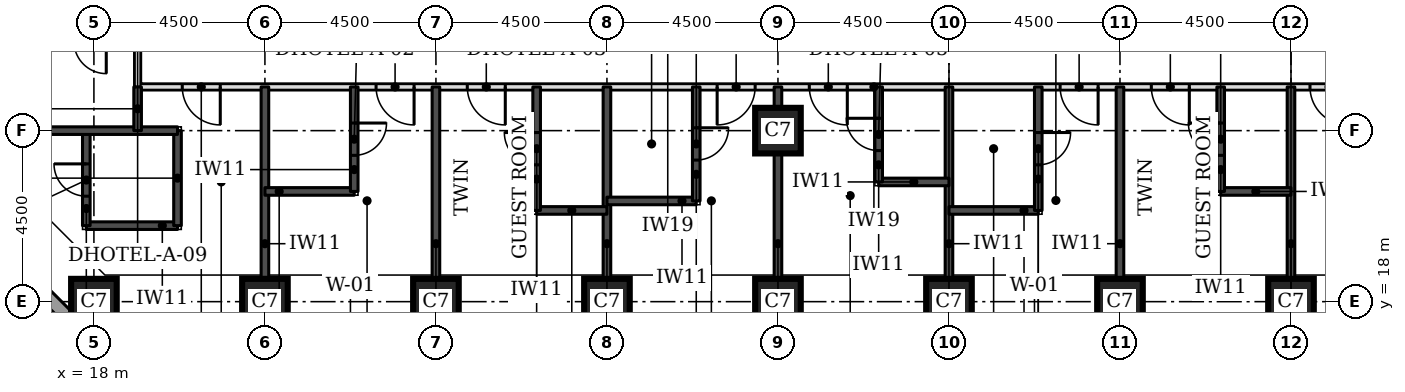
"""IFC4 building model, lengths in metres.
Left out: names, types, materials, properties, quantities, classifications, styles, units other than length and angle.
Written with IfcOpenShell. Run it as: python <this file> out.ifc"""

import sys

from ifc_helpers import new_model, si_unit, direction, frame, frame_2d, origin, origin_2d, place, context, subcontext, project, spatial, rectangle, extrude, element, fill, save


model = new_model("IFC4")
c1 = context("Model", 3, precision=1e-05, world=origin(), true_north=direction((0.0, 1.0)))
c2 = subcontext(c1, "Body", "Model", "MODEL_VIEW")
j1 = project(units=[si_unit("LENGTHUNIT", "METRE"), si_unit("PLANEANGLEUNIT", "RADIAN")], contexts=[c1])
p1 = place(None, origin())
s1 = spatial("IfcSite", under=j1, at=p1, CompositionType="ELEMENT")
p2 = place(p1, origin())
s2 = spatial("IfcBuilding", under=s1, at=p2, CompositionType="ELEMENT")
p3 = place(p2, frame((0.0, 0.0, 26.4)))
s3 = spatial("IfcBuildingStorey", under=s2, at=p3, CompositionType="ELEMENT", Elevation=26.4)
for number, where, z_axis, x_axis in (
    (1, (18.0, 18.0, 0.0), (0.0, 0.0, 1.0), (1.0, 0.0, 0.0)),
    (2, (22.5, 18.0, 0.0), (0.0, 0.0, 1.0), (1.0, 0.0, 0.0)),
    (3, (27.0, 18.0, 0.0), (0.0, 0.0, 1.0), (1.0, 0.0, 0.0)),
    (4, (31.5, 18.0, 0.0), (0.0, 0.0, 1.0), (1.0, 0.0, 0.0)),
    (5, (36.0, 18.0, 0.0), (0.0, 0.0, 1.0), (1.0, 0.0, 0.0)),
    (6, (40.5, 18.0, 0.0), (0.0, 0.0, 1.0), (1.0, 0.0, 0.0)),
    (7, (45.0, 18.0, 0.0), (0.0, 0.0, 1.0), (1.0, 0.0, 0.0)),
    (8, (49.5, 18.0, 0.0), (0.0, 0.0, 1.0), (1.0, 0.0, 0.0)),
    (9, (36.0, 22.5, 0.0), (0.0, 0.0, 1.0), (1.0, 0.0, 0.0)),
):
    element("IfcColumn", number, at=place(p3, frame(where, z_axis=z_axis, x_axis=x_axis)), inside=s3, PredefinedType="COLUMN", context=c2, shape_type="SweptSolid", body=[
        extrude(rectangle(XDim=1.2, YDim=1.2, at=origin_2d()), origin(), (0.0, 0.0, 1.0), 3.3),
    ])
p4 = place(p3, frame((12.674, 22.23, 0.0), z_axis=(0.0, 0.0, 1.0), x_axis=(0.707106781187, -0.707106781187, 0.0)))
e10 = element("IfcWall", 10, at=p4, inside=s3, PredefinedType="STANDARD", context=c2, shape_type="SweptSolid", body=[
    extrude(rectangle(XDim=7.151, YDim=0.35, at=frame_2d((3.576, 0.0))), origin(), (0.0, 0.0, 1.0), 3.055),
])
p5 = place(p4, frame((1.926, 0.0, 0.8)))
e11 = element("IfcOpeningElement", 11, at=p5, cuts=e10, PredefinedType="OPENING", context=c2, shape_type="SweptSolid", body=[
    extrude(rectangle(XDim=3.3, YDim=1.5, at=frame_2d((1.65, 0.75))), frame((0.0, 0.185, 0.0), z_axis=(0.0, -1.0, 0.0), x_axis=(1.0, 0.0, 0.0)), (0.0, 0.0, 1.0), 0.37),
])
p6 = place(p3, frame((19.15, 23.65, 0.0), z_axis=(0.0, 0.0, 1.0), x_axis=(1.0, 0.0, 0.0)))
e12 = element("IfcWall", 12, at=p6, inside=s3, PredefinedType="PARTITIONING", context=c2, shape_type="SweptSolid", body=[
    extrude(rectangle(XDim=32.35, YDim=0.15, at=frame_2d((16.175, 0.0))), origin(), (0.0, 0.0, 1.0), 3.08),
])
p7 = place(p6, frame((6.275, 0.0, 0.0)))
e13 = element("IfcOpeningElement", 13, at=p7, cuts=e12, PredefinedType="OPENING", context=c2, shape_type="SweptSolid", body=[
    extrude(rectangle(XDim=1.0, YDim=2.1, at=frame_2d((0.5, 1.05))), frame((0.0, 0.085, 0.0), z_axis=(0.0, -1.0, 0.0), x_axis=(1.0, 0.0, 0.0)), (0.0, 0.0, 1.0), 0.17),
])
p8 = place(p6, frame((8.675, 0.0, 0.0)))
e14 = element("IfcOpeningElement", 14, at=p8, cuts=e12, PredefinedType="OPENING", context=c2, shape_type="SweptSolid", body=[
    extrude(rectangle(XDim=1.0, YDim=2.1, at=frame_2d((0.5, 1.05))), frame((0.0, 0.085, 0.0), z_axis=(0.0, -1.0, 0.0), x_axis=(1.0, 0.0, 0.0)), (0.0, 0.0, 1.0), 0.17),
])
p9 = place(p6, frame((15.25, 0.0, 0.0)))
e15 = element("IfcOpeningElement", 15, at=p9, cuts=e12, PredefinedType="OPENING", context=c2, shape_type="SweptSolid", body=[
    extrude(rectangle(XDim=1.0, YDim=2.1, at=frame_2d((0.5, 1.05))), frame((0.0, 0.085, 0.0), z_axis=(0.0, -1.0, 0.0), x_axis=(1.0, 0.0, 0.0)), (0.0, 0.0, 1.0), 0.17),
])
p10 = place(p6, frame((17.675, 0.0, 0.0)))
e16 = element("IfcOpeningElement", 16, at=p10, cuts=e12, PredefinedType="OPENING", context=c2, shape_type="SweptSolid", body=[
    extrude(rectangle(XDim=1.0, YDim=2.1, at=frame_2d((0.5, 1.05))), frame((0.0, 0.085, 0.0), z_axis=(0.0, -1.0, 0.0), x_axis=(1.0, 0.0, 0.0)), (0.0, 0.0, 1.0), 0.17),
])
p11 = place(p6, frame((24.275, 0.0, 0.0)))
e17 = element("IfcOpeningElement", 17, at=p11, cuts=e12, PredefinedType="OPENING", context=c2, shape_type="SweptSolid", body=[
    extrude(rectangle(XDim=1.0, YDim=2.1, at=frame_2d((0.5, 1.05))), frame((0.0, 0.085, 0.0), z_axis=(0.0, -1.0, 0.0), x_axis=(1.0, 0.0, 0.0)), (0.0, 0.0, 1.0), 0.17),
])
p12 = place(p6, frame((26.675, 0.0, 0.0)))
e18 = element("IfcOpeningElement", 18, at=p12, cuts=e12, PredefinedType="OPENING", context=c2, shape_type="SweptSolid", body=[
    extrude(rectangle(XDim=1.0, YDim=2.1, at=frame_2d((0.5, 1.05))), frame((0.0, 0.085, 0.0), z_axis=(0.0, -1.0, 0.0), x_axis=(1.0, 0.0, 0.0)), (0.0, 0.0, 1.0), 0.17),
])
p13 = place(p6, frame((1.175, 0.0, 0.0)))
e19 = element("IfcOpeningElement", 19, at=p13, cuts=e12, PredefinedType="OPENING", context=c2, shape_type="SweptSolid", body=[
    extrude(rectangle(XDim=1.0, YDim=2.1, at=frame_2d((0.5, 1.05))), frame((0.0, 0.085, 0.0), z_axis=(0.0, -1.0, 0.0), x_axis=(1.0, 0.0, 0.0)), (0.0, 0.0, 1.0), 0.17),
])
p14 = place(p6, frame((30.85, 0.0, 0.0)))
e20 = element("IfcOpeningElement", 20, at=p14, cuts=e12, PredefinedType="OPENING", context=c2, shape_type="SweptSolid", body=[
    extrude(rectangle(XDim=1.0, YDim=2.1, at=frame_2d((0.5, 1.05))), frame((0.0, 0.085, 0.0), z_axis=(0.0, -1.0, 0.0), x_axis=(1.0, 0.0, 0.0)), (0.0, 0.0, 1.0), 0.17),
])
p15 = place(p3, frame((19.15, 23.65, 0.0), z_axis=(0.0, 0.0, 1.0), x_axis=(0.0, 1.0, 0.0)))
e21 = element("IfcWall", 21, at=p15, inside=s3, PredefinedType="PARTITIONING", context=c2, shape_type="SweptSolid", body=[
    extrude(rectangle(XDim=25.85, YDim=0.15, at=frame_2d((12.925, 0.0))), origin(), (0.0, 0.0, 1.0), 3.08),
])
p16 = place(p15, frame((1.775, 0.0, 0.0)))
e22 = element("IfcOpeningElement", 22, at=p16, cuts=e21, PredefinedType="OPENING", context=c2, shape_type="SweptSolid", body=[
    extrude(rectangle(XDim=1.0, YDim=2.1, at=frame_2d((0.5, 1.05))), frame((0.0, 0.085, 0.0), z_axis=(0.0, -1.0, 0.0), x_axis=(1.0, 0.0, 0.0)), (0.0, 0.0, 1.0), 0.17),
])
p17 = place(p15, frame((6.125, 0.0, 0.0)))
e23 = element("IfcOpeningElement", 23, at=p17, cuts=e21, PredefinedType="OPENING", context=c2, shape_type="SweptSolid", body=[
    extrude(rectangle(XDim=1.0, YDim=2.1, at=frame_2d((0.5, 1.05))), frame((0.0, 0.085, 0.0), z_axis=(0.0, -1.0, 0.0), x_axis=(1.0, 0.0, 0.0)), (0.0, 0.0, 1.0), 0.17),
])
p18 = place(p15, frame((17.825, 0.0, 0.0)))
e24 = element("IfcOpeningElement", 24, at=p18, cuts=e21, PredefinedType="OPENING", context=c2, shape_type="SweptSolid", body=[
    extrude(rectangle(XDim=1.0, YDim=2.1, at=frame_2d((0.5, 1.05))), frame((0.0, 0.085, 0.0), z_axis=(0.0, -1.0, 0.0), x_axis=(1.0, 0.0, 0.0)), (0.0, 0.0, 1.0), 0.17),
])
p19 = place(p15, frame((23.04, 0.0, 0.0)))
e25 = element("IfcOpeningElement", 25, at=p19, cuts=e21, PredefinedType="OPENING", context=c2, shape_type="SweptSolid", body=[
    extrude(rectangle(XDim=0.9, YDim=2.1, at=frame_2d((0.45, 1.05))), frame((0.0, 0.085, 0.0), z_axis=(0.0, -1.0, 0.0), x_axis=(1.0, 0.0, 0.0)), (0.0, 0.0, 1.0), 0.17),
])
for number, where, z_axis, x_axis in (
    (26, (22.5, 18.6, 0.0), (0.0, 0.0, 1.0), (0.0, 1.0, 0.0)),
    (27, (27.0, 18.6, 0.0), (0.0, 0.0, 1.0), (0.0, 1.0, 0.0)),
    (28, (31.5, 18.6, 0.0), (0.0, 0.0, 1.0), (0.0, 1.0, 0.0)),
    (29, (36.0, 18.6, 0.0), (0.0, 0.0, 1.0), (0.0, 1.0, 0.0)),
    (30, (40.5, 18.6, 0.0), (0.0, 0.0, 1.0), (0.0, 1.0, 0.0)),
    (31, (45.0, 18.6, 0.0), (0.0, 0.0, 1.0), (0.0, 1.0, 0.0)),
    (32, (49.5, 18.6, 0.0), (0.0, 0.0, 1.0), (0.0, 1.0, 0.0)),
):
    element("IfcWall", number, at=place(p3, frame(where, z_axis=z_axis, x_axis=x_axis)), inside=s3, PredefinedType="SOLIDWALL", context=c2, shape_type="SweptSolid", body=[
        extrude(rectangle(XDim=5.05, YDim=0.2, at=frame_2d((2.525, 0.0))), origin(), (0.0, 0.0, 1.0), 3.08),
    ])
p20 = place(p3, frame((17.8, 20.0, 0.0), z_axis=(0.0, 0.0, 1.0), x_axis=(1.0, 0.0, 0.0)))
e33 = element("IfcWall", 33, at=p20, inside=s3, PredefinedType="SOLIDWALL", context=c2, shape_type="SweptSolid", body=[
    extrude(rectangle(XDim=2.4, YDim=0.2, at=frame_2d((1.2, 0.0))), origin(), (0.0, 0.0, 1.0), 3.08),
])
p21 = place(p3, frame((17.8, 20.0, 0.0), z_axis=(0.0, 0.0, 1.0), x_axis=(0.0, 1.0, 0.0)))
e34 = element("IfcWall", 34, at=p21, inside=s3, PredefinedType="SOLIDWALL", context=c2, shape_type="SweptSolid", body=[
    extrude(rectangle(XDim=2.5, YDim=0.2, at=frame_2d((1.25, 0.0))), origin(), (0.0, 0.0, 1.0), 3.08),
])
p22 = place(p21, frame((0.775, 0.0, 0.0)))
e35 = element("IfcOpeningElement", 35, at=p22, cuts=e34, PredefinedType="OPENING", context=c2, shape_type="SweptSolid", body=[
    extrude(rectangle(XDim=0.85, YDim=2.1, at=frame_2d((0.425, 1.05))), frame((0.0, 0.11, 0.0), z_axis=(0.0, -1.0, 0.0), x_axis=(1.0, 0.0, 0.0)), (0.0, 0.0, 1.0), 0.22),
])
p23 = place(p3, frame((20.2, 20.0, 0.0), z_axis=(0.0, 0.0, 1.0), x_axis=(0.0, 1.0, 0.0)))
e36 = element("IfcWall", 36, at=p23, inside=s3, PredefinedType="SOLIDWALL", context=c2, shape_type="SweptSolid", body=[
    extrude(rectangle(XDim=2.5, YDim=0.2, at=frame_2d((1.25, 0.0))), origin(), (0.0, 0.0, 1.0), 3.08),
])
p24 = place(p3, frame((29.65, 20.4, 0.0), z_axis=(0.0, 0.0, 1.0), x_axis=(1.0, 0.0, 0.0)))
e37 = element("IfcWall", 37, at=p24, inside=s3, PredefinedType="SOLIDWALL", context=c2, shape_type="SweptSolid", body=[
    extrude(rectangle(XDim=1.85, YDim=0.2, at=frame_2d((0.925, 0.0))), origin(), (0.0, 0.0, 1.0), 3.08),
])
p25 = place(p3, frame((29.65, 20.4, 0.0), z_axis=(0.0, 0.0, 1.0), x_axis=(0.0, 1.0, 0.0)))
e38 = element("IfcWall", 38, at=p25, inside=s3, PredefinedType="SOLIDWALL", context=c2, shape_type="SweptSolid", body=[
    extrude(rectangle(XDim=3.25, YDim=0.2, at=frame_2d((1.625, 0.0))), origin(), (0.0, 0.0, 1.0), 3.08),
])
p26 = place(p25, frame((1.2, 0.0, 0.0)))
e39 = element("IfcOpeningElement", 39, at=p26, cuts=e38, PredefinedType="OPENING", context=c2, shape_type="SweptSolid", body=[
    extrude(rectangle(XDim=0.85, YDim=2.1, at=frame_2d((0.425, 1.05))), frame((0.0, 0.11, 0.0), z_axis=(0.0, -1.0, 0.0), x_axis=(1.0, 0.0, 0.0)), (0.0, 0.0, 1.0), 0.22),
])
p27 = place(p3, frame((40.5, 20.4, 0.0), z_axis=(0.0, 0.0, 1.0), x_axis=(1.0, 0.0, 0.0)))
e40 = element("IfcWall", 40, at=p27, inside=s3, PredefinedType="SOLIDWALL", context=c2, shape_type="SweptSolid", body=[
    extrude(rectangle(XDim=2.35, YDim=0.2, at=frame_2d((1.175, 0.0))), origin(), (0.0, 0.0, 1.0), 3.08),
])
p28 = place(p3, frame((42.85, 20.4, 0.0), z_axis=(0.0, 0.0, 1.0), x_axis=(0.0, 1.0, 0.0)))
e41 = element("IfcWall", 41, at=p28, inside=s3, PredefinedType="SOLIDWALL", context=c2, shape_type="SweptSolid", body=[
    extrude(rectangle(XDim=3.25, YDim=0.2, at=frame_2d((1.625, 0.0))), origin(), (0.0, 0.0, 1.0), 3.08),
])
p29 = place(p28, frame((1.2, 0.0, 0.0)))
e42 = element("IfcOpeningElement", 42, at=p29, cuts=e41, PredefinedType="OPENING", context=c2, shape_type="SweptSolid", body=[
    extrude(rectangle(XDim=0.85, YDim=2.1, at=frame_2d((0.425, 1.05))), frame((0.0, 0.11, 0.0), z_axis=(0.0, -1.0, 0.0), x_axis=(1.0, 0.0, 0.0)), (0.0, 0.0, 1.0), 0.22),
])
p30 = place(p3, frame((31.5, 20.65, 0.0), z_axis=(0.0, 0.0, 1.0), x_axis=(1.0, 0.0, 0.0)))
e43 = element("IfcWall", 43, at=p30, inside=s3, PredefinedType="SOLIDWALL", context=c2, shape_type="SweptSolid", body=[
    extrude(rectangle(XDim=2.35, YDim=0.2, at=frame_2d((1.175, 0.0))), origin(), (0.0, 0.0, 1.0), 3.08),
])
p31 = place(p3, frame((33.85, 20.65, 0.0), z_axis=(0.0, 0.0, 1.0), x_axis=(0.0, 1.0, 0.0)))
e44 = element("IfcWall", 44, at=p31, inside=s3, PredefinedType="SOLIDWALL", context=c2, shape_type="SweptSolid", body=[
    extrude(rectangle(XDim=3.0, YDim=0.2, at=frame_2d((1.5, 0.0))), origin(), (0.0, 0.0, 1.0), 3.08),
])
p32 = place(p31, frame((1.075, 0.0, 0.0)))
e45 = element("IfcOpeningElement", 45, at=p32, cuts=e44, PredefinedType="OPENING", context=c2, shape_type="SweptSolid", body=[
    extrude(rectangle(XDim=0.85, YDim=2.1, at=frame_2d((0.425, 1.05))), frame((0.0, 0.11, 0.0), z_axis=(0.0, -1.0, 0.0), x_axis=(1.0, 0.0, 0.0)), (0.0, 0.0, 1.0), 0.22),
])
p33 = place(p3, frame((22.5, 20.9, 0.0), z_axis=(0.0, 0.0, 1.0), x_axis=(1.0, 0.0, 0.0)))
e46 = element("IfcWall", 46, at=p33, inside=s3, PredefinedType="SOLIDWALL", context=c2, shape_type="SweptSolid", body=[
    extrude(rectangle(XDim=2.35, YDim=0.2, at=frame_2d((1.175, 0.0))), origin(), (0.0, 0.0, 1.0), 3.08),
])
p34 = place(p3, frame((24.85, 20.9, 0.0), z_axis=(0.0, 0.0, 1.0), x_axis=(0.0, 1.0, 0.0)))
e47 = element("IfcWall", 47, at=p34, inside=s3, PredefinedType="SOLIDWALL", context=c2, shape_type="SweptSolid", body=[
    extrude(rectangle(XDim=2.75, YDim=0.2, at=frame_2d((1.375, 0.0))), origin(), (0.0, 0.0, 1.0), 3.08),
])
p35 = place(p34, frame((0.95, 0.0, 0.0)))
e48 = element("IfcOpeningElement", 48, at=p35, cuts=e47, PredefinedType="OPENING", context=c2, shape_type="SweptSolid", body=[
    extrude(rectangle(XDim=0.85, YDim=2.1, at=frame_2d((0.425, 1.05))), frame((0.0, 0.11, 0.0), z_axis=(0.0, -1.0, 0.0), x_axis=(1.0, 0.0, 0.0)), (0.0, 0.0, 1.0), 0.22),
])
p36 = place(p3, frame((47.65, 20.9, 0.0), z_axis=(0.0, 0.0, 1.0), x_axis=(1.0, 0.0, 0.0)))
e49 = element("IfcWall", 49, at=p36, inside=s3, PredefinedType="SOLIDWALL", context=c2, shape_type="SweptSolid", body=[
    extrude(rectangle(XDim=1.85, YDim=0.2, at=frame_2d((0.925, 0.0))), origin(), (0.0, 0.0, 1.0), 3.08),
])
p37 = place(p3, frame((47.65, 20.9, 0.0), z_axis=(0.0, 0.0, 1.0), x_axis=(0.0, 1.0, 0.0)))
e50 = element("IfcWall", 50, at=p37, inside=s3, PredefinedType="SOLIDWALL", context=c2, shape_type="SweptSolid", body=[
    extrude(rectangle(XDim=2.75, YDim=0.2, at=frame_2d((1.375, 0.0))), origin(), (0.0, 0.0, 1.0), 3.08),
])
p38 = place(p37, frame((0.95, 0.0, 0.0)))
e51 = element("IfcOpeningElement", 51, at=p38, cuts=e50, PredefinedType="OPENING", context=c2, shape_type="SweptSolid", body=[
    extrude(rectangle(XDim=0.85, YDim=2.1, at=frame_2d((0.425, 1.05))), frame((0.0, 0.11, 0.0), z_axis=(0.0, -1.0, 0.0), x_axis=(1.0, 0.0, 0.0)), (0.0, 0.0, 1.0), 0.22),
])
p39 = place(p3, frame((38.65, 21.15, 0.0), z_axis=(0.0, 0.0, 1.0), x_axis=(1.0, 0.0, 0.0)))
e52 = element("IfcWall", 52, at=p39, inside=s3, PredefinedType="SOLIDWALL", context=c2, shape_type="SweptSolid", body=[
    extrude(rectangle(XDim=1.85, YDim=0.2, at=frame_2d((0.925, 0.0))), origin(), (0.0, 0.0, 1.0), 3.08),
])
p40 = place(p3, frame((38.65, 21.15, 0.0), z_axis=(0.0, 0.0, 1.0), x_axis=(0.0, 1.0, 0.0)))
e53 = element("IfcWall", 53, at=p40, inside=s3, PredefinedType="SOLIDWALL", context=c2, shape_type="SweptSolid", body=[
    extrude(rectangle(XDim=2.5, YDim=0.2, at=frame_2d((1.25, 0.0))), origin(), (0.0, 0.0, 1.0), 3.08),
])
p41 = place(p40, frame((0.825, 0.0, 0.0)))
e54 = element("IfcOpeningElement", 54, at=p41, cuts=e53, PredefinedType="OPENING", context=c2, shape_type="SweptSolid", body=[
    extrude(rectangle(XDim=0.85, YDim=2.1, at=frame_2d((0.425, 1.05))), frame((0.0, 0.11, 0.0), z_axis=(0.0, -1.0, 0.0), x_axis=(1.0, 0.0, 0.0)), (0.0, 0.0, 1.0), 0.22),
])
p42 = place(p3, frame((14.1, 22.5, 0.0), z_axis=(0.0, 0.0, 1.0), x_axis=(1.0, 0.0, 0.0)))
e55 = element("IfcWall", 55, at=p42, inside=s3, PredefinedType="SOLIDWALL", context=c2, shape_type="SweptSolid", body=[
    extrude(rectangle(XDim=6.1, YDim=0.2, at=frame_2d((3.05, 0.0))), origin(), (0.0, 0.0, 1.0), 3.08),
])
p43 = place(p3, frame((19.15, 22.5, 0.0), z_axis=(0.0, 0.0, 1.0), x_axis=(0.0, 1.0, 0.0)))
e56 = element("IfcWall", 56, at=p43, inside=s3, PredefinedType="SOLIDWALL", context=c2, shape_type="SweptSolid", body=[
    extrude(rectangle(XDim=1.15, YDim=0.2, at=frame_2d((0.575, 0.0))), origin(), (0.0, 0.0, 1.0), 3.08),
])
p44 = place(p7, frame((1.0, 0.0, 0.0), z_axis=(0.0, 0.0, 1.0), x_axis=(-1.0, 0.0, 0.0)))
e57 = element("IfcDoor", 57, at=p44, inside=s3, OperationType="SINGLE_SWING_LEFT", PredefinedType="DOOR", context=c2, shape_type="SweptSolid", body=[
    extrude(rectangle(XDim=1.0, YDim=2.1, at=frame_2d((0.5, 1.05))), frame((0.0, 0.025, 0.0), z_axis=(0.0, -1.0, 0.0), x_axis=(1.0, 0.0, 0.0)), (0.0, 0.0, 1.0), 0.05),
])
fill(e13, e57)
p45 = place(p35, frame((0.85, 0.0, 0.0), z_axis=(0.0, 0.0, 1.0), x_axis=(-1.0, 0.0, 0.0)))
e58 = element("IfcDoor", 58, at=p45, inside=s3, OperationType="SINGLE_SWING_LEFT", PredefinedType="DOOR", context=c2, shape_type="SweptSolid", body=[
    extrude(rectangle(XDim=0.85, YDim=2.1, at=frame_2d((0.425, 1.05))), frame((0.0, 0.025, 0.0), z_axis=(0.0, -1.0, 0.0), x_axis=(1.0, 0.0, 0.0)), (0.0, 0.0, 1.0), 0.05),
])
fill(e48, e58)
p46 = place(p8, frame((1.0, 0.0, 0.0), z_axis=(0.0, 0.0, 1.0), x_axis=(-1.0, 0.0, 0.0)))
e59 = element("IfcDoor", 59, at=p46, inside=s3, OperationType="SINGLE_SWING_LEFT", PredefinedType="DOOR", context=c2, shape_type="SweptSolid", body=[
    extrude(rectangle(XDim=1.0, YDim=2.1, at=frame_2d((0.5, 1.05))), frame((0.0, 0.025, 0.0), z_axis=(0.0, -1.0, 0.0), x_axis=(1.0, 0.0, 0.0)), (0.0, 0.0, 1.0), 0.05),
])
fill(e14, e59)
p47 = place(p26, origin())
e60 = element("IfcDoor", 60, at=p47, inside=s3, OperationType="SINGLE_SWING_RIGHT", PredefinedType="DOOR", context=c2, shape_type="SweptSolid", body=[
    extrude(rectangle(XDim=0.85, YDim=2.1, at=frame_2d((0.425, 1.05))), frame((0.0, 0.025, 0.0), z_axis=(0.0, -1.0, 0.0), x_axis=(1.0, 0.0, 0.0)), (0.0, 0.0, 1.0), 0.05),
])
fill(e39, e60)
p48 = place(p9, frame((1.0, 0.0, 0.0), z_axis=(0.0, 0.0, 1.0), x_axis=(-1.0, 0.0, 0.0)))
e61 = element("IfcDoor", 61, at=p48, inside=s3, OperationType="SINGLE_SWING_RIGHT", PredefinedType="DOOR", context=c2, shape_type="SweptSolid", body=[
    extrude(rectangle(XDim=1.0, YDim=2.1, at=frame_2d((0.5, 1.05))), frame((0.0, 0.025, 0.0), z_axis=(0.0, -1.0, 0.0), x_axis=(1.0, 0.0, 0.0)), (0.0, 0.0, 1.0), 0.05),
])
fill(e15, e61)
p49 = place(p32, frame((0.85, 0.0, 0.0), z_axis=(0.0, 0.0, 1.0), x_axis=(-1.0, 0.0, 0.0)))
e62 = element("IfcDoor", 62, at=p49, inside=s3, OperationType="SINGLE_SWING_LEFT", PredefinedType="DOOR", context=c2, shape_type="SweptSolid", body=[
    extrude(rectangle(XDim=0.85, YDim=2.1, at=frame_2d((0.425, 1.05))), frame((0.0, 0.025, 0.0), z_axis=(0.0, -1.0, 0.0), x_axis=(1.0, 0.0, 0.0)), (0.0, 0.0, 1.0), 0.05),
])
fill(e45, e62)
p50 = place(p10, frame((1.0, 0.0, 0.0), z_axis=(0.0, 0.0, 1.0), x_axis=(-1.0, 0.0, 0.0)))
e63 = element("IfcDoor", 63, at=p50, inside=s3, OperationType="SINGLE_SWING_LEFT", PredefinedType="DOOR", context=c2, shape_type="SweptSolid", body=[
    extrude(rectangle(XDim=1.0, YDim=2.1, at=frame_2d((0.5, 1.05))), frame((0.0, 0.025, 0.0), z_axis=(0.0, -1.0, 0.0), x_axis=(1.0, 0.0, 0.0)), (0.0, 0.0, 1.0), 0.05),
])
fill(e16, e63)
p51 = place(p41, origin())
e64 = element("IfcDoor", 64, at=p51, inside=s3, OperationType="SINGLE_SWING_RIGHT", PredefinedType="DOOR", context=c2, shape_type="SweptSolid", body=[
    extrude(rectangle(XDim=0.85, YDim=2.1, at=frame_2d((0.425, 1.05))), frame((0.0, 0.025, 0.0), z_axis=(0.0, -1.0, 0.0), x_axis=(1.0, 0.0, 0.0)), (0.0, 0.0, 1.0), 0.05),
])
fill(e54, e64)
p52 = place(p11, frame((1.0, 0.0, 0.0), z_axis=(0.0, 0.0, 1.0), x_axis=(-1.0, 0.0, 0.0)))
e65 = element("IfcDoor", 65, at=p52, inside=s3, OperationType="SINGLE_SWING_LEFT", PredefinedType="DOOR", context=c2, shape_type="SweptSolid", body=[
    extrude(rectangle(XDim=1.0, YDim=2.1, at=frame_2d((0.5, 1.05))), frame((0.0, 0.025, 0.0), z_axis=(0.0, -1.0, 0.0), x_axis=(1.0, 0.0, 0.0)), (0.0, 0.0, 1.0), 0.05),
])
fill(e17, e65)
p53 = place(p29, frame((0.85, 0.0, 0.0), z_axis=(0.0, 0.0, 1.0), x_axis=(-1.0, 0.0, 0.0)))
e66 = element("IfcDoor", 66, at=p53, inside=s3, OperationType="SINGLE_SWING_LEFT", PredefinedType="DOOR", context=c2, shape_type="SweptSolid", body=[
    extrude(rectangle(XDim=0.85, YDim=2.1, at=frame_2d((0.425, 1.05))), frame((0.0, 0.025, 0.0), z_axis=(0.0, -1.0, 0.0), x_axis=(1.0, 0.0, 0.0)), (0.0, 0.0, 1.0), 0.05),
])
fill(e42, e66)
p54 = place(p12, frame((1.0, 0.0, 0.0), z_axis=(0.0, 0.0, 1.0), x_axis=(-1.0, 0.0, 0.0)))
e67 = element("IfcDoor", 67, at=p54, inside=s3, OperationType="SINGLE_SWING_LEFT", PredefinedType="DOOR", context=c2, shape_type="SweptSolid", body=[
    extrude(rectangle(XDim=1.0, YDim=2.1, at=frame_2d((0.5, 1.05))), frame((0.0, 0.025, 0.0), z_axis=(0.0, -1.0, 0.0), x_axis=(1.0, 0.0, 0.0)), (0.0, 0.0, 1.0), 0.05),
])
fill(e18, e67)
p55 = place(p38, origin())
e68 = element("IfcDoor", 68, at=p55, inside=s3, OperationType="SINGLE_SWING_RIGHT", PredefinedType="DOOR", context=c2, shape_type="SweptSolid", body=[
    extrude(rectangle(XDim=0.85, YDim=2.1, at=frame_2d((0.425, 1.05))), frame((0.0, 0.025, 0.0), z_axis=(0.0, -1.0, 0.0), x_axis=(1.0, 0.0, 0.0)), (0.0, 0.0, 1.0), 0.05),
])
fill(e51, e68)
p56 = place(p13, frame((1.0, 0.0, 0.0), z_axis=(0.0, 0.0, 1.0), x_axis=(-1.0, 0.0, 0.0)))
e69 = element("IfcDoor", 69, at=p56, inside=s3, OperationType="SINGLE_SWING_LEFT", PredefinedType="DOOR", context=c2, shape_type="SweptSolid", body=[
    extrude(rectangle(XDim=1.0, YDim=2.1, at=frame_2d((0.5, 1.05))), frame((0.0, 0.025, 0.0), z_axis=(0.0, -1.0, 0.0), x_axis=(1.0, 0.0, 0.0)), (0.0, 0.0, 1.0), 0.05),
])
fill(e19, e69)
p57 = place(p22, origin())
e70 = element("IfcDoor", 70, at=p57, inside=s3, OperationType="SINGLE_SWING_RIGHT", PredefinedType="DOOR", context=c2, shape_type="SweptSolid", body=[
    extrude(rectangle(XDim=0.85, YDim=2.1, at=frame_2d((0.425, 1.05))), frame((0.0, 0.025, 0.0), z_axis=(0.0, -1.0, 0.0), x_axis=(1.0, 0.0, 0.0)), (0.0, 0.0, 1.0), 0.05),
])
fill(e35, e70)
p58 = place(p14, frame((1.0, 0.0, 0.0), z_axis=(0.0, 0.0, 1.0), x_axis=(-1.0, 0.0, 0.0)))
e71 = element("IfcDoor", 71, at=p58, inside=s3, OperationType="SINGLE_SWING_LEFT", PredefinedType="DOOR", context=c2, shape_type="SweptSolid", body=[
    extrude(rectangle(XDim=1.0, YDim=2.1, at=frame_2d((0.5, 1.05))), frame((0.0, 0.025, 0.0), z_axis=(0.0, -1.0, 0.0), x_axis=(1.0, 0.0, 0.0)), (0.0, 0.0, 1.0), 0.05),
])
fill(e20, e71)
save(model, sys.argv[1])
